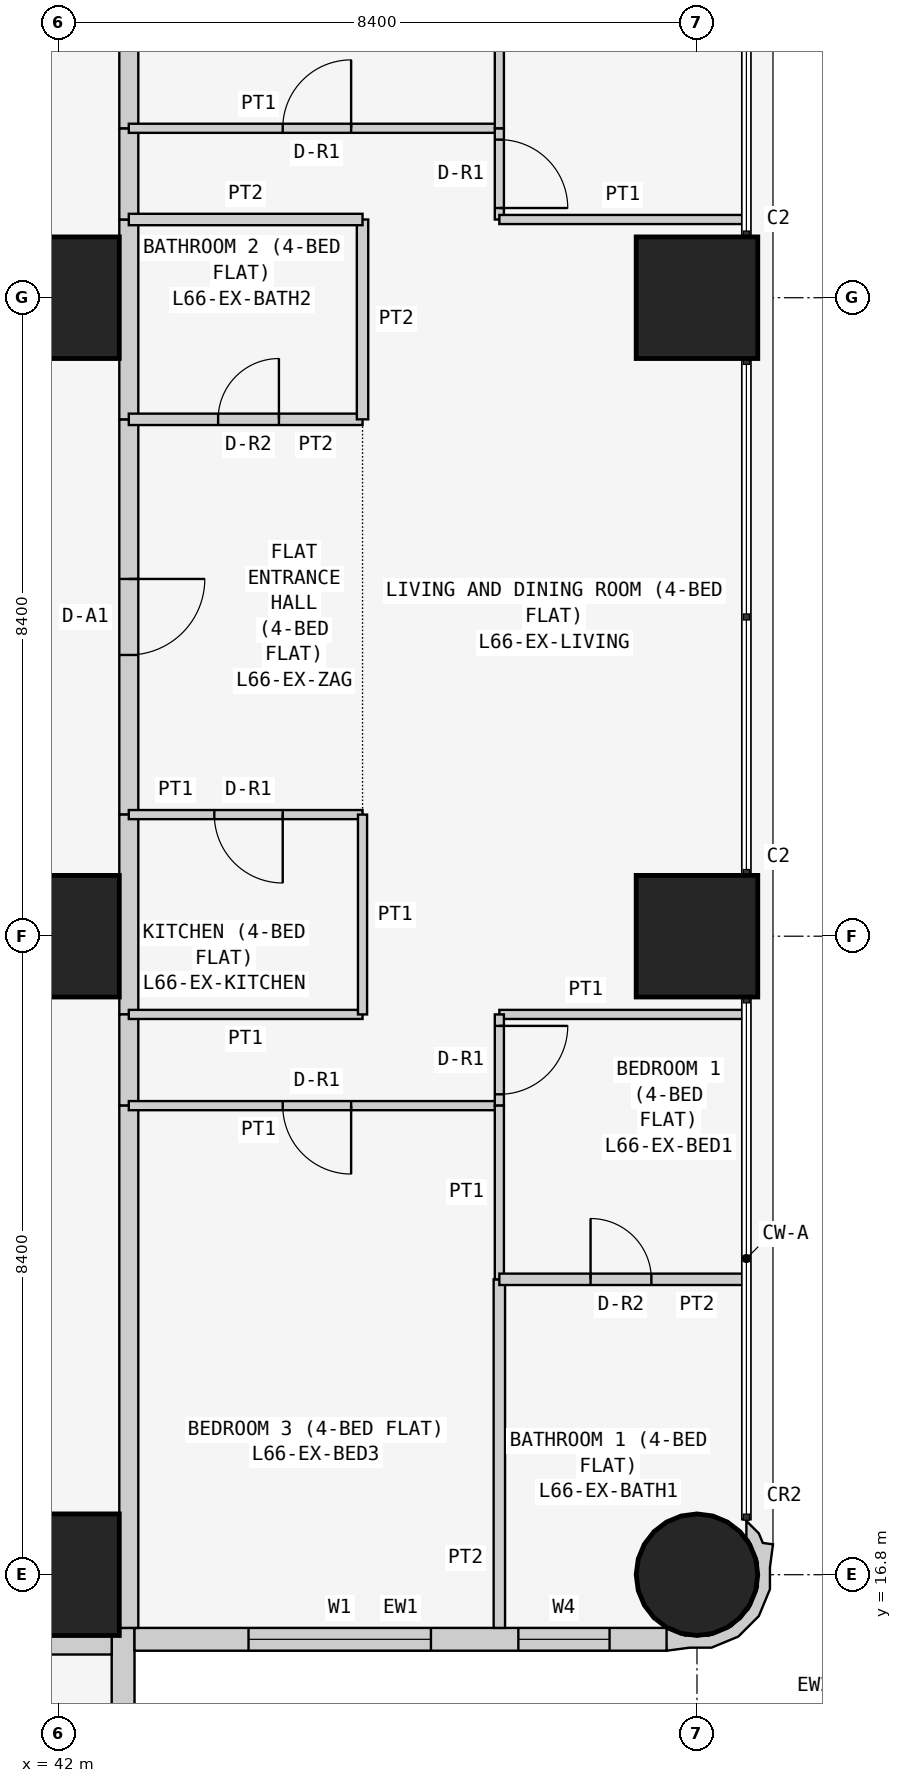
"""IFC4 building model, lengths in metres.
Left out: names, types, materials, properties, quantities, classifications, styles, units other than length and angle.
Written with IfcOpenShell. Run it as: python <this file> out.ifc"""

import sys

from ifc_helpers import new_model, si_unit, direction, frame, frame_2d, origin, origin_2d, place, context, subcontext, project, spatial, polyline, rectangle, circle, outline, extrude, element, fill, save


model = new_model("IFC4")
c1 = context("Model", 3, precision=1e-05, world=origin(), true_north=direction((0.0, 1.0)))
c2 = subcontext(c1, "Body", "Model", "MODEL_VIEW")
j1 = project(units=[si_unit("LENGTHUNIT", "METRE"), si_unit("PLANEANGLEUNIT", "RADIAN")], contexts=[c1])
p1 = place(None, origin())
s1 = spatial("IfcSite", under=j1, at=p1, CompositionType="ELEMENT")
p2 = place(p1, origin())
s2 = spatial("IfcBuilding", under=s1, at=p2, CompositionType="ELEMENT")
p3 = place(p2, frame((0.0, 0.0, 254.1)))
s3 = spatial("IfcBuildingStorey", under=s2, at=p3, CompositionType="ELEMENT", Elevation=254.1)
for number, where, z_axis, x_axis in (
    (1, (42.0, 16.8, 0.0), (0.0, 0.0, 1.0), (1.0, 0.0, 0.0)),
    (2, (42.0, 25.2, 0.0), (0.0, 0.0, 1.0), (1.0, 0.0, 0.0)),
    (3, (42.0, 33.6, 0.0), (0.0, 0.0, 1.0), (1.0, 0.0, 0.0)),
):
    element("IfcColumn", number, at=place(p3, frame(where, z_axis=z_axis, x_axis=x_axis)), inside=s3, PredefinedType="COLUMN", context=c2, shape_type="SweptSolid", body=[
        extrude(rectangle(XDim=1.6, YDim=1.6, at=origin_2d()), origin(), (0.0, 0.0, 1.0), 3.6),
    ])
p4 = place(p3, frame((50.4, 16.8, 0.0), z_axis=(0.0, 0.0, 1.0), x_axis=(1.0, 0.0, 0.0)))
e4 = element("IfcColumn", 4, at=p4, inside=s3, PredefinedType="COLUMN", context=c2, shape_type="SweptSolid", body=[
    extrude(circle(Radius=0.8, at=origin_2d()), origin(), (0.0, 0.0, 1.0), 3.6),
])
for number, where, z_axis, x_axis in (
    (5, (50.4, 25.2, 0.0), (0.0, 0.0, 1.0), (1.0, 0.0, 0.0)),
    (6, (50.4, 33.6, 0.0), (0.0, 0.0, 1.0), (1.0, 0.0, 0.0)),
):
    element("IfcColumn", number, at=place(p3, frame(where, z_axis=z_axis, x_axis=x_axis)), inside=s3, PredefinedType="COLUMN", context=c2, shape_type="SweptSolid", body=[
        extrude(rectangle(XDim=1.6, YDim=1.6, at=origin_2d()), origin(), (0.0, 0.0, 1.0), 3.6),
    ])
p5 = place(p3, frame((42.85, 8.8, 0.0), z_axis=(0.0, 0.0, 1.0), x_axis=(0.0, 1.0, 0.0)))
e7 = element("IfcWall", 7, at=p5, inside=s3, PredefinedType="SOLIDWALL", context=c2, shape_type="SweptSolid", body=[
    extrude(rectangle(XDim=7.3, YDim=0.3, at=frame_2d((3.65, 0.0))), origin(), (0.0, 0.0, 1.0), 3.45),
])
p6 = place(p5, frame((3.1, 0.0, 0.9)))
e8 = element("IfcOpeningElement", 8, at=p6, cuts=e7, PredefinedType="OPENING", context=c2, shape_type="SweptSolid", body=[
    extrude(rectangle(XDim=2.4, YDim=1.5, at=frame_2d((1.2, 0.75))), frame((0.0, 0.16, 0.0), z_axis=(0.0, -1.0, 0.0), x_axis=(1.0, 0.0, 0.0)), (0.0, 0.0, 1.0), 0.32),
])
p7 = place(p5, frame((0.75, 0.0, 0.9)))
e9 = element("IfcOpeningElement", 9, at=p7, cuts=e7, PredefinedType="OPENING", context=c2, shape_type="SweptSolid", body=[
    extrude(rectangle(XDim=1.2, YDim=1.5, at=frame_2d((0.6, 0.75))), frame((0.0, 0.16, 0.0), z_axis=(0.0, -1.0, 0.0), x_axis=(1.0, 0.0, 0.0)), (0.0, 0.0, 1.0), 0.32),
])
p8 = place(p3, frame((43.0, 15.95, 0.0), z_axis=(0.0, 0.0, 1.0), x_axis=(1.0, 0.0, 0.0)))
e10 = element("IfcWall", 10, at=p8, inside=s3, PredefinedType="SOLIDWALL", context=c2, shape_type="SweptSolid", body=[
    extrude(rectangle(XDim=7.0, YDim=0.3, at=frame_2d((3.5, 0.0))), origin(), (0.0, 0.0, 1.0), 3.45),
])
p9 = place(p8, frame((1.5, 0.0, 0.9)))
e11 = element("IfcOpeningElement", 11, at=p9, cuts=e10, PredefinedType="OPENING", context=c2, shape_type="SweptSolid", body=[
    extrude(rectangle(XDim=2.4, YDim=1.5, at=frame_2d((1.2, 0.75))), frame((0.0, 0.16, 0.0), z_axis=(0.0, -1.0, 0.0), x_axis=(1.0, 0.0, 0.0)), (0.0, 0.0, 1.0), 0.32),
])
p10 = place(p8, frame((5.05, 0.0, 0.9)))
e12 = element("IfcOpeningElement", 12, at=p10, cuts=e10, PredefinedType="OPENING", context=c2, shape_type="SweptSolid", body=[
    extrude(rectangle(XDim=1.2, YDim=1.5, at=frame_2d((0.6, 0.75))), frame((0.0, 0.16, 0.0), z_axis=(0.0, -1.0, 0.0), x_axis=(1.0, 0.0, 0.0)), (0.0, 0.0, 1.0), 0.32),
])
p11 = place(p3, frame((50.073, 15.983, 0.0), z_axis=(0.0, 0.0, 1.0), x_axis=(0.93923434088, -0.343276641956, 0.0)))
e13 = element("IfcWall", 13, at=p11, inside=s3, PredefinedType="SOLIDWALL", context=c2, shape_type="SweptSolid", body=[
    extrude(outline(polyline([(0.828, 1.598), (0.697, 1.569), (0.604, 1.67), (0.394, 1.767), (0.471, 1.556), (0.509, 1.539), (0.724, 1.304), (0.833, 1.005), (0.82, 0.686), (0.686, 0.397), (0.451, 0.182), (0.152, 0.073), (-0.116, 0.084), (-0.128, 0.078), (-0.146, 0.071), (-0.006, -0.197), (0.266, -0.055), (0.535, 0.044), (0.817, 0.302), (0.978, 0.648), (0.994, 1.03), (0.895, 1.3), (0.828, 1.598)])), origin(), (0.0, 0.0, 1.0), 3.45),
])
p12 = place(p3, frame((42.925, 32.0, 0.0), z_axis=(0.0, 0.0, 1.0), x_axis=(0.0, -1.0, 0.0)))
e14 = element("IfcWall", 14, at=p12, inside=s3, PredefinedType="PARTITIONING", context=c2, shape_type="SweptSolid", body=[
    extrude(rectangle(XDim=5.2, YDim=0.25, at=frame_2d((2.6, 0.0))), origin(), (0.0, 0.0, 1.0), 3.45),
])
p13 = place(p12, frame((2.1, 0.0, 0.0)))
e15 = element("IfcOpeningElement", 15, at=p13, cuts=e14, PredefinedType="OPENING", context=c2, shape_type="SweptSolid", body=[
    extrude(rectangle(XDim=1.0, YDim=2.1, at=frame_2d((0.5, 1.05))), frame((0.0, 0.135, 0.0), z_axis=(0.0, -1.0, 0.0), x_axis=(1.0, 0.0, 0.0)), (0.0, 0.0, 1.0), 0.27),
])
p14 = place(p3, frame((42.925, 34.629, 0.0), z_axis=(0.0, 0.0, 1.0), x_axis=(0.0, -1.0, 0.0)))
e16 = element("IfcWall", 16, at=p14, inside=s3, PredefinedType="PARTITIONING", context=c2, shape_type="SweptSolid", body=[
    extrude(rectangle(XDim=2.629, YDim=0.25, at=frame_2d((1.314, 0.0))), origin(), (0.0, 0.0, 1.0), 3.45),
])
p15 = place(p3, frame((42.925, 26.8, 0.0), z_axis=(0.0, 0.0, 1.0), x_axis=(0.0, -1.0, 0.0)))
e17 = element("IfcWall", 17, at=p15, inside=s3, PredefinedType="PARTITIONING", context=c2, shape_type="SweptSolid", body=[
    extrude(rectangle(XDim=2.629, YDim=0.25, at=frame_2d((1.314, 0.0))), origin(), (0.0, 0.0, 1.0), 3.45),
])
p16 = place(p3, frame((42.925, 24.171, 0.0), z_axis=(0.0, 0.0, 1.0), x_axis=(0.0, -1.0, 0.0)))
e18 = element("IfcWall", 18, at=p16, inside=s3, PredefinedType="PARTITIONING", context=c2, shape_type="SweptSolid", body=[
    extrude(rectangle(XDim=1.2, YDim=0.25, at=frame_2d((0.6, 0.0))), origin(), (0.0, 0.0, 1.0), 3.45),
])
p17 = place(p3, frame((42.925, 35.829, 0.0), z_axis=(0.0, 0.0, 1.0), x_axis=(0.0, -1.0, 0.0)))
e19 = element("IfcWall", 19, at=p17, inside=s3, PredefinedType="PARTITIONING", context=c2, shape_type="SweptSolid", body=[
    extrude(rectangle(XDim=1.2, YDim=0.25, at=frame_2d((0.6, 0.0))), origin(), (0.0, 0.0, 1.0), 3.45),
])
for number, where, z_axis, x_axis in (
    (20, (42.925, 42.7, 0.0), (0.0, 0.0, 1.0), (0.0, -1.0, 0.0)),
    (21, (42.925, 22.971, 0.0), (0.0, 0.0, 1.0), (0.0, -1.0, 0.0)),
    (22, (42.7, 15.875, 0.0), (0.0, 0.0, 1.0), (-1.0, 0.0, 0.0)),
):
    element("IfcWall", number, at=place(p3, frame(where, z_axis=z_axis, x_axis=x_axis)), inside=s3, PredefinedType="PARTITIONING", context=c2, shape_type="SweptSolid", body=[
        extrude(rectangle(XDim=6.871, YDim=0.25, at=frame_2d((3.436, 0.0))), origin(), (0.0, 0.0, 1.0), 3.45),
    ])
p18 = place(p3, frame((46.0, 32.0, 0.0), z_axis=(0.0, 0.0, 1.0), x_axis=(-1.0, 0.0, 0.0)))
e23 = element("IfcWall", 23, at=p18, inside=s3, PredefinedType="PARTITIONING", context=c2, shape_type="SweptSolid", body=[
    extrude(rectangle(XDim=3.075, YDim=0.15, at=frame_2d((1.538, 0.0))), origin(), (0.0, 0.0, 1.0), 3.45),
])
p19 = place(p18, frame((1.1, 0.0, 0.0)))
e24 = element("IfcOpeningElement", 24, at=p19, cuts=e23, PredefinedType="OPENING", context=c2, shape_type="SweptSolid", body=[
    extrude(rectangle(XDim=0.8, YDim=2.1, at=frame_2d((0.4, 1.05))), frame((0.0, 0.085, 0.0), z_axis=(0.0, -1.0, 0.0), x_axis=(1.0, 0.0, 0.0)), (0.0, 0.0, 1.0), 0.17),
])
p20 = place(p3, frame((42.925, 26.8, 0.0), z_axis=(0.0, 0.0, 1.0), x_axis=(1.0, 0.0, 0.0)))
e25 = element("IfcWall", 25, at=p20, inside=s3, PredefinedType="PARTITIONING", context=c2, shape_type="SweptSolid", body=[
    extrude(rectangle(XDim=3.075, YDim=0.12, at=frame_2d((1.538, 0.0))), origin(), (0.0, 0.0, 1.0), 3.45),
])
p21 = place(p20, frame((1.125, 0.0, 0.0)))
e26 = element("IfcOpeningElement", 26, at=p21, cuts=e25, PredefinedType="OPENING", context=c2, shape_type="SweptSolid", body=[
    extrude(rectangle(XDim=0.9, YDim=2.1, at=frame_2d((0.45, 1.05))), frame((0.0, 0.07, 0.0), z_axis=(0.0, -1.0, 0.0), x_axis=(1.0, 0.0, 0.0)), (0.0, 0.0, 1.0), 0.14),
])
p22 = place(p3, frame((46.0, 32.0, 0.0), z_axis=(0.0, 0.0, 1.0), x_axis=(0.0, 1.0, 0.0)))
e27 = element("IfcWall", 27, at=p22, inside=s3, PredefinedType="PARTITIONING", context=c2, shape_type="SweptSolid", body=[
    extrude(rectangle(XDim=2.629, YDim=0.15, at=frame_2d((1.314, 0.0))), origin(), (0.0, 0.0, 1.0), 3.45),
])
p23 = place(p3, frame((46.0, 34.629, 0.0), z_axis=(0.0, 0.0, 1.0), x_axis=(-1.0, 0.0, 0.0)))
e28 = element("IfcWall", 28, at=p23, inside=s3, PredefinedType="PARTITIONING", context=c2, shape_type="SweptSolid", body=[
    extrude(rectangle(XDim=3.075, YDim=0.15, at=frame_2d((1.538, 0.0))), origin(), (0.0, 0.0, 1.0), 3.45),
])
p24 = place(p3, frame((42.925, 24.171, 0.0), z_axis=(0.0, 0.0, 1.0), x_axis=(1.0, 0.0, 0.0)))
e29 = element("IfcWall", 29, at=p24, inside=s3, PredefinedType="PARTITIONING", context=c2, shape_type="SweptSolid", body=[
    extrude(rectangle(XDim=3.075, YDim=0.12, at=frame_2d((1.538, 0.0))), origin(), (0.0, 0.0, 1.0), 3.45),
])
p25 = place(p3, frame((46.0, 24.171, 0.0), z_axis=(0.0, 0.0, 1.0), x_axis=(0.0, 1.0, 0.0)))
e30 = element("IfcWall", 30, at=p25, inside=s3, PredefinedType="PARTITIONING", context=c2, shape_type="SweptSolid", body=[
    extrude(rectangle(XDim=2.629, YDim=0.12, at=frame_2d((1.314, 0.0))), origin(), (0.0, 0.0, 1.0), 3.45),
])
p26 = place(p3, frame((42.925, 35.829, 0.0), z_axis=(0.0, 0.0, 1.0), x_axis=(1.0, 0.0, 0.0)))
e31 = element("IfcWall", 31, at=p26, inside=s3, PredefinedType="PARTITIONING", context=c2, shape_type="SweptSolid", body=[
    extrude(rectangle(XDim=4.875, YDim=0.12, at=frame_2d((2.438, 0.0))), origin(), (0.0, 0.0, 1.0), 3.45),
])
p27 = place(p26, frame((2.025, 0.0, 0.0)))
e32 = element("IfcOpeningElement", 32, at=p27, cuts=e31, PredefinedType="OPENING", context=c2, shape_type="SweptSolid", body=[
    extrude(rectangle(XDim=0.9, YDim=2.1, at=frame_2d((0.45, 1.05))), frame((0.0, 0.07, 0.0), z_axis=(0.0, -1.0, 0.0), x_axis=(1.0, 0.0, 0.0)), (0.0, 0.0, 1.0), 0.14),
])
p28 = place(p3, frame((47.8, 35.829, 0.0), z_axis=(0.0, 0.0, 1.0), x_axis=(0.0, -1.0, 0.0)))
e33 = element("IfcWall", 33, at=p28, inside=s3, PredefinedType="PARTITIONING", context=c2, shape_type="SweptSolid", body=[
    extrude(rectangle(XDim=1.2, YDim=0.12, at=frame_2d((0.6, 0.0))), origin(), (0.0, 0.0, 1.0), 3.45),
])
p29 = place(p28, frame((0.149, 0.0, 0.0)))
e34 = element("IfcOpeningElement", 34, at=p29, cuts=e33, PredefinedType="OPENING", context=c2, shape_type="SweptSolid", body=[
    extrude(rectangle(XDim=0.9, YDim=2.1, at=frame_2d((0.45, 1.05))), frame((0.0, 0.07, 0.0), z_axis=(0.0, -1.0, 0.0), x_axis=(1.0, 0.0, 0.0)), (0.0, 0.0, 1.0), 0.14),
])
p30 = place(p3, frame((47.8, 34.629, 0.0), z_axis=(0.0, 0.0, 1.0), x_axis=(1.0, 0.0, 0.0)))
e35 = element("IfcWall", 35, at=p30, inside=s3, PredefinedType="PARTITIONING", context=c2, shape_type="SweptSolid", body=[
    extrude(rectangle(XDim=3.25, YDim=0.12, at=frame_2d((1.625, 0.0))), origin(), (0.0, 0.0, 1.0), 3.45),
])
p31 = place(p3, frame((47.8, 22.971, 0.0), z_axis=(0.0, 0.0, 1.0), x_axis=(-1.0, 0.0, 0.0)))
e36 = element("IfcWall", 36, at=p31, inside=s3, PredefinedType="PARTITIONING", context=c2, shape_type="SweptSolid", body=[
    extrude(rectangle(XDim=4.875, YDim=0.12, at=frame_2d((2.438, 0.0))), origin(), (0.0, 0.0, 1.0), 3.45),
])
p32 = place(p31, frame((1.95, 0.0, 0.0)))
e37 = element("IfcOpeningElement", 37, at=p32, cuts=e36, PredefinedType="OPENING", context=c2, shape_type="SweptSolid", body=[
    extrude(rectangle(XDim=0.9, YDim=2.1, at=frame_2d((0.45, 1.05))), frame((0.0, 0.07, 0.0), z_axis=(0.0, -1.0, 0.0), x_axis=(1.0, 0.0, 0.0)), (0.0, 0.0, 1.0), 0.14),
])
p33 = place(p3, frame((51.05, 24.171, 0.0), z_axis=(0.0, 0.0, 1.0), x_axis=(-1.0, 0.0, 0.0)))
e38 = element("IfcWall", 38, at=p33, inside=s3, PredefinedType="PARTITIONING", context=c2, shape_type="SweptSolid", body=[
    extrude(rectangle(XDim=3.25, YDim=0.12, at=frame_2d((1.625, 0.0))), origin(), (0.0, 0.0, 1.0), 3.45),
])
p34 = place(p3, frame((47.8, 24.171, 0.0), z_axis=(0.0, 0.0, 1.0), x_axis=(0.0, -1.0, 0.0)))
e39 = element("IfcWall", 39, at=p34, inside=s3, PredefinedType="PARTITIONING", context=c2, shape_type="SweptSolid", body=[
    extrude(rectangle(XDim=1.2, YDim=0.12, at=frame_2d((0.6, 0.0))), origin(), (0.0, 0.0, 1.0), 3.45),
])
p35 = place(p34, frame((0.151, 0.0, 0.0)))
e40 = element("IfcOpeningElement", 40, at=p35, cuts=e39, PredefinedType="OPENING", context=c2, shape_type="SweptSolid", body=[
    extrude(rectangle(XDim=0.9, YDim=2.1, at=frame_2d((0.45, 1.05))), frame((0.0, 0.07, 0.0), z_axis=(0.0, -1.0, 0.0), x_axis=(1.0, 0.0, 0.0)), (0.0, 0.0, 1.0), 0.14),
])
p36 = place(p3, frame((47.8, 35.829, 0.0), z_axis=(0.0, 0.0, 1.0), x_axis=(0.0, 1.0, 0.0)))
e41 = element("IfcWall", 41, at=p36, inside=s3, PredefinedType="PARTITIONING", context=c2, shape_type="SweptSolid", body=[
    extrude(rectangle(XDim=6.871, YDim=0.12, at=frame_2d((3.436, 0.0))), origin(), (0.0, 0.0, 1.0), 3.45),
])
p37 = place(p3, frame((47.8, 16.1, 0.0), z_axis=(0.0, 0.0, 1.0), x_axis=(0.0, 1.0, 0.0)))
e42 = element("IfcWall", 42, at=p37, inside=s3, PredefinedType="PARTITIONING", context=c2, shape_type="SweptSolid", body=[
    extrude(rectangle(XDim=4.586, YDim=0.15, at=frame_2d((2.293, 0.0))), origin(), (0.0, 0.0, 1.0), 3.45),
])
p38 = place(p3, frame((47.8, 20.686, 0.0), z_axis=(0.0, 0.0, 1.0), x_axis=(0.0, 1.0, 0.0)))
e43 = element("IfcWall", 43, at=p38, inside=s3, PredefinedType="PARTITIONING", context=c2, shape_type="SweptSolid", body=[
    extrude(rectangle(XDim=2.285, YDim=0.12, at=frame_2d((1.143, 0.0))), origin(), (0.0, 0.0, 1.0), 3.45),
])
p39 = place(p3, frame((51.05, 20.686, 0.0), z_axis=(0.0, 0.0, 1.0), x_axis=(-1.0, 0.0, 0.0)))
e44 = element("IfcWall", 44, at=p39, inside=s3, PredefinedType="PARTITIONING", context=c2, shape_type="SweptSolid", body=[
    extrude(rectangle(XDim=3.25, YDim=0.15, at=frame_2d((1.625, 0.0))), origin(), (0.0, 0.0, 1.0), 3.45),
])
p40 = place(p39, frame((1.25, 0.0, 0.0)))
e45 = element("IfcOpeningElement", 45, at=p40, cuts=e44, PredefinedType="OPENING", context=c2, shape_type="SweptSolid", body=[
    extrude(rectangle(XDim=0.8, YDim=2.1, at=frame_2d((0.4, 1.05))), frame((0.0, 0.085, 0.0), z_axis=(0.0, -1.0, 0.0), x_axis=(1.0, 0.0, 0.0)), (0.0, 0.0, 1.0), 0.17),
])
p41 = place(p9, origin())
e46 = element("IfcWindow", 46, at=p41, inside=s3, PartitioningType="SINGLE_PANEL", PredefinedType="WINDOW", context=c2, shape_type="SweptSolid", body=[
    extrude(rectangle(XDim=2.4, YDim=1.5, at=frame_2d((1.2, 0.75))), frame((0.0, 0.03, 0.0), z_axis=(0.0, -1.0, 0.0), x_axis=(1.0, 0.0, 0.0)), (0.0, 0.0, 1.0), 0.06),
])
fill(e11, e46)
p42 = place(p10, origin())
e47 = element("IfcWindow", 47, at=p42, inside=s3, PartitioningType="SINGLE_PANEL", PredefinedType="WINDOW", context=c2, shape_type="SweptSolid", body=[
    extrude(rectangle(XDim=1.2, YDim=1.5, at=frame_2d((0.6, 0.75))), frame((0.0, 0.03, 0.0), z_axis=(0.0, -1.0, 0.0), x_axis=(1.0, 0.0, 0.0)), (0.0, 0.0, 1.0), 0.06),
])
fill(e12, e47)
p43 = place(p13, origin())
e48 = element("IfcDoor", 48, at=p43, inside=s3, OperationType="SINGLE_SWING_LEFT", PredefinedType="DOOR", context=c2, shape_type="SweptSolid", body=[
    extrude(rectangle(XDim=1.0, YDim=2.1, at=frame_2d((0.5, 1.05))), frame((0.0, 0.025, 0.0), z_axis=(0.0, -1.0, 0.0), x_axis=(1.0, 0.0, 0.0)), (0.0, 0.0, 1.0), 0.05),
])
fill(e15, e48)
p44 = place(p19, frame((0.8, 0.0, 0.0), z_axis=(0.0, 0.0, 1.0), x_axis=(-1.0, 0.0, 0.0)))
e49 = element("IfcDoor", 49, at=p44, inside=s3, OperationType="SINGLE_SWING_RIGHT", PredefinedType="DOOR", context=c2, shape_type="SweptSolid", body=[
    extrude(rectangle(XDim=0.8, YDim=2.1, at=frame_2d((0.4, 1.05))), frame((0.0, 0.025, 0.0), z_axis=(0.0, -1.0, 0.0), x_axis=(1.0, 0.0, 0.0)), (0.0, 0.0, 1.0), 0.05),
])
fill(e24, e49)
p45 = place(p21, frame((0.9, 0.0, 0.0), z_axis=(0.0, 0.0, 1.0), x_axis=(-1.0, 0.0, 0.0)))
e50 = element("IfcDoor", 50, at=p45, inside=s3, OperationType="SINGLE_SWING_LEFT", PredefinedType="DOOR", context=c2, shape_type="SweptSolid", body=[
    extrude(rectangle(XDim=0.9, YDim=2.1, at=frame_2d((0.45, 1.05))), frame((0.0, 0.025, 0.0), z_axis=(0.0, -1.0, 0.0), x_axis=(1.0, 0.0, 0.0)), (0.0, 0.0, 1.0), 0.05),
])
fill(e26, e50)
p46 = place(p27, origin())
e51 = element("IfcDoor", 51, at=p46, inside=s3, OperationType="SINGLE_SWING_RIGHT", PredefinedType="DOOR", context=c2, shape_type="SweptSolid", body=[
    extrude(rectangle(XDim=0.9, YDim=2.1, at=frame_2d((0.45, 1.05))), frame((0.0, 0.025, 0.0), z_axis=(0.0, -1.0, 0.0), x_axis=(1.0, 0.0, 0.0)), (0.0, 0.0, 1.0), 0.05),
])
fill(e32, e51)
p47 = place(p29, origin())
e52 = element("IfcDoor", 52, at=p47, inside=s3, OperationType="SINGLE_SWING_RIGHT", PredefinedType="DOOR", context=c2, shape_type="SweptSolid", body=[
    extrude(rectangle(XDim=0.9, YDim=2.1, at=frame_2d((0.45, 1.05))), frame((0.0, 0.025, 0.0), z_axis=(0.0, -1.0, 0.0), x_axis=(1.0, 0.0, 0.0)), (0.0, 0.0, 1.0), 0.05),
])
fill(e34, e52)
p48 = place(p32, origin())
e53 = element("IfcDoor", 53, at=p48, inside=s3, OperationType="SINGLE_SWING_LEFT", PredefinedType="DOOR", context=c2, shape_type="SweptSolid", body=[
    extrude(rectangle(XDim=0.9, YDim=2.1, at=frame_2d((0.45, 1.05))), frame((0.0, 0.025, 0.0), z_axis=(0.0, -1.0, 0.0), x_axis=(1.0, 0.0, 0.0)), (0.0, 0.0, 1.0), 0.05),
])
fill(e37, e53)
p49 = place(p35, origin())
e54 = element("IfcDoor", 54, at=p49, inside=s3, OperationType="SINGLE_SWING_LEFT", PredefinedType="DOOR", context=c2, shape_type="SweptSolid", body=[
    extrude(rectangle(XDim=0.9, YDim=2.1, at=frame_2d((0.45, 1.05))), frame((0.0, 0.025, 0.0), z_axis=(0.0, -1.0, 0.0), x_axis=(1.0, 0.0, 0.0)), (0.0, 0.0, 1.0), 0.05),
])
fill(e40, e54)
p50 = place(p40, frame((0.8, 0.0, 0.0), z_axis=(0.0, 0.0, 1.0), x_axis=(-1.0, 0.0, 0.0)))
e55 = element("IfcDoor", 55, at=p50, inside=s3, OperationType="SINGLE_SWING_LEFT", PredefinedType="DOOR", context=c2, shape_type="SweptSolid", body=[
    extrude(rectangle(XDim=0.8, YDim=2.1, at=frame_2d((0.4, 1.05))), frame((0.0, 0.025, 0.0), z_axis=(0.0, -1.0, 0.0), x_axis=(1.0, 0.0, 0.0)), (0.0, 0.0, 1.0), 0.05),
])
fill(e45, e55)
save(model, sys.argv[1])
